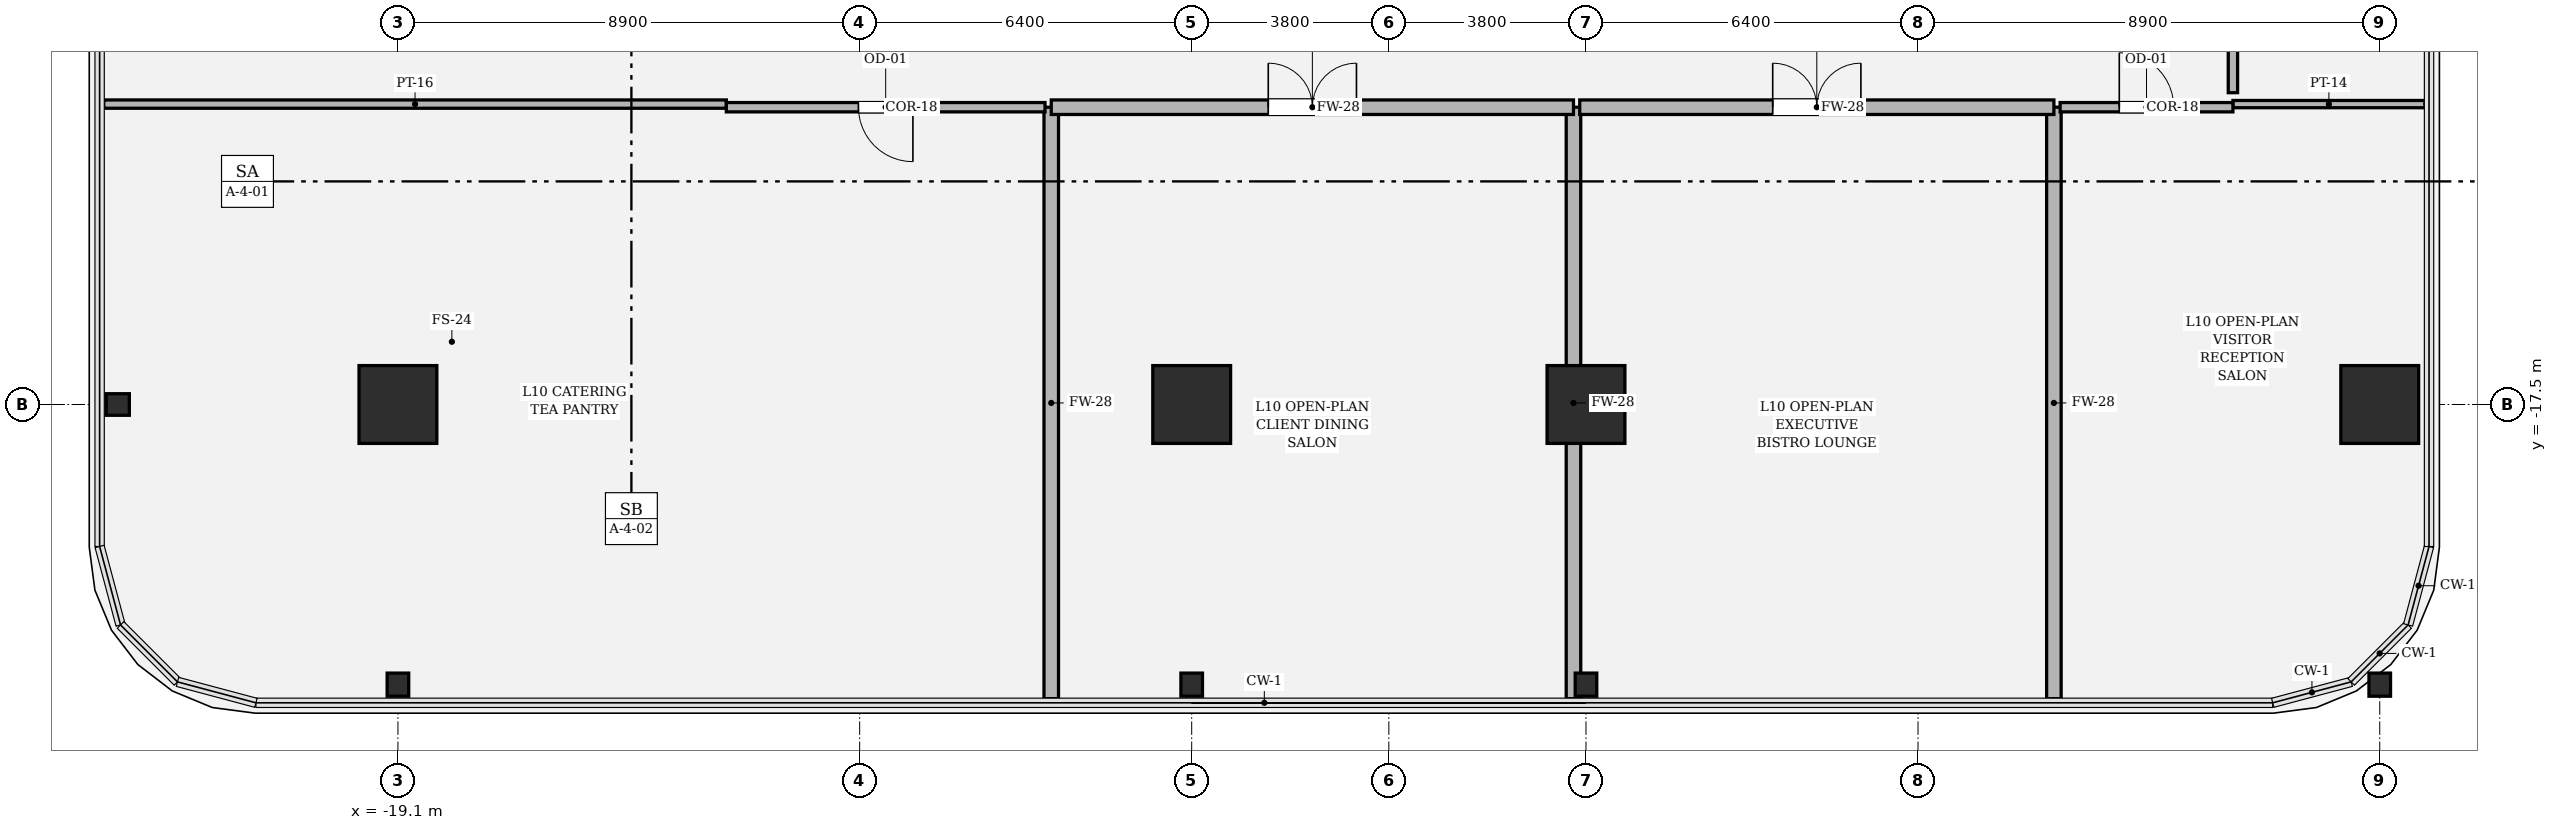
"""IFC4 building model, lengths in metres.
Left out: names, types, materials, properties, quantities, classifications, styles, units other than length and angle.
Written with IfcOpenShell. Run it as: python <this file> out.ifc"""

import sys

from ifc_helpers import new_model, si_unit, direction, frame, frame_2d, origin, origin_2d, place, context, subcontext, project, spatial, rectangle, hollow_rectangle, i_section, extrude, element, fill, save


model = new_model("IFC4")
c1 = context("Model", 3, precision=1e-05, world=origin(), true_north=direction((0.0, 1.0)))
c2 = subcontext(c1, "Body", "Model", "MODEL_VIEW")
j1 = project(units=[si_unit("LENGTHUNIT", "METRE"), si_unit("PLANEANGLEUNIT", "RADIAN")], contexts=[c1])
p1 = place(None, origin())
s1 = spatial("IfcSite", under=j1, at=p1, CompositionType="ELEMENT")
p2 = place(p1, origin())
s2 = spatial("IfcBuilding", under=s1, at=p2, CompositionType="ELEMENT")
p3 = place(p2, frame((0.0, 0.0, 48.45)))
s3 = spatial("IfcBuildingStorey", under=s2, at=p3, CompositionType="ELEMENT", Elevation=48.45)
for number, where, z_axis, x_axis in (
    (1, (-19.1, -17.5, 0.0), (0.0, 0.0, 1.0), (1.0, 0.0, 0.0)),
    (2, (-3.8, -17.5, 0.0), (0.0, 0.0, 1.0), (1.0, 0.0, 0.0)),
    (3, (3.8, -17.5, 0.0), (0.0, 0.0, 1.0), (1.0, 0.0, 0.0)),
    (4, (19.1, -17.5, 0.0), (0.0, 0.0, 1.0), (1.0, 0.0, 0.0)),
):
    element("IfcColumn", number, at=place(p3, frame(where, z_axis=z_axis, x_axis=x_axis)), inside=s3, PredefinedType="COLUMN", context=c2, shape_type="SweptSolid", body=[
        extrude(hollow_rectangle(XDim=1.5, YDim=1.5, WallThickness=0.045, at=origin_2d()), origin(), (0.0, 0.0, 1.0), 4.05),
    ])
for number, where, z_axis, x_axis in (
    (5, (-19.1, -22.9, 0.0), (0.0, 0.0, 1.0), (1.0, 0.0, 0.0)),
    (6, (-3.8, -22.9, 0.0), (0.0, 0.0, 1.0), (1.0, 0.0, 0.0)),
    (7, (3.8, -22.9, 0.0), (0.0, 0.0, 1.0), (1.0, 0.0, 0.0)),
    (8, (19.1, -22.9, 0.0), (0.0, 0.0, 1.0), (1.0, 0.0, 0.0)),
    (9, (-24.5, -17.5, 0.0), (0.0, 0.0, 1.0), (0.0, 1.0, 0.0)),
):
    element("IfcColumn", number, at=place(p3, frame(where, z_axis=z_axis, x_axis=x_axis)), inside=s3, PredefinedType="COLUMN", context=c2, shape_type="SweptSolid", body=[
        extrude(i_section(OverallWidth=0.416, OverallDepth=0.446, WebThickness=0.039, FlangeThickness=0.062, FilletRadius=0.018, at=origin_2d()), origin(), (0.0, 0.0, 1.0), 4.048),
    ])
p4 = place(p3, frame((3.559, -11.77, 0.0), z_axis=(0.0, 0.0, 1.0), x_axis=(0.0, -1.0, 0.0)))
e10 = element("IfcWall", 10, at=p4, inside=s3, PredefinedType="SOLIDWALL", context=c2, shape_type="SweptSolid", body=[
    extrude(rectangle(XDim=11.4, YDim=0.28, at=frame_2d((5.7, 0.0))), origin(), (0.0, 0.0, 1.0), 2.484),
])
p5 = place(p3, frame((-6.507, -23.17, 0.0), z_axis=(0.0, 0.0, 1.0), x_axis=(0.0, 1.0, 0.0)))
e11 = element("IfcWall", 11, at=p5, inside=s3, PredefinedType="SOLIDWALL", context=c2, shape_type="SweptSolid", body=[
    extrude(rectangle(XDim=11.4, YDim=0.28, at=frame_2d((5.7, 0.0))), origin(), (0.0, 0.0, 1.0), 2.524),
])
p6 = place(p3, frame((-6.507, -11.77, 0.0), z_axis=(0.0, 0.0, 1.0), x_axis=(1.0, 0.0, 0.0)))
e12 = element("IfcWall", 12, at=p6, inside=s3, PredefinedType="SOLIDWALL", context=c2, shape_type="SweptSolid", body=[
    extrude(rectangle(XDim=10.066, YDim=0.28, at=frame_2d((5.033, 0.0))), origin(), (0.0, 0.0, 1.0), 3.104),
])
p7 = place(p6, frame((4.183, 0.0, 0.0)))
e13 = element("IfcOpeningElement", 13, at=p7, cuts=e12, PredefinedType="OPENING", context=c2, shape_type="SweptSolid", body=[
    extrude(rectangle(XDim=1.7, YDim=2.3, at=frame_2d((0.85, 1.15))), frame((0.0, 0.15, 0.0), z_axis=(0.0, -1.0, 0.0), x_axis=(1.0, 0.0, 0.0)), (0.0, 0.0, 1.0), 0.3),
])
p8 = place(p3, frame((12.819, -11.77, 0.0), z_axis=(0.0, 0.0, 1.0), x_axis=(0.0, -1.0, 0.0)))
e14 = element("IfcWall", 14, at=p8, inside=s3, PredefinedType="SOLIDWALL", context=c2, shape_type="SweptSolid", body=[
    extrude(rectangle(XDim=11.4, YDim=0.28, at=frame_2d((5.7, 0.0))), origin(), (0.0, 0.0, 1.0), 2.524),
])
p9 = place(p3, frame((3.679, -11.77, 0.0), z_axis=(0.0, 0.0, 1.0), x_axis=(1.0, 0.0, 0.0)))
e15 = element("IfcWall", 15, at=p9, inside=s3, PredefinedType="SOLIDWALL", context=c2, shape_type="SweptSolid", body=[
    extrude(rectangle(XDim=9.14, YDim=0.28, at=frame_2d((4.57, 0.0))), origin(), (0.0, 0.0, 1.0), 3.104),
])
p10 = place(p9, frame((3.72, 0.0, 0.0)))
e16 = element("IfcOpeningElement", 16, at=p10, cuts=e15, PredefinedType="OPENING", context=c2, shape_type="SweptSolid", body=[
    extrude(rectangle(XDim=1.7, YDim=2.3, at=frame_2d((0.85, 1.15))), frame((0.0, 0.15, 0.0), z_axis=(0.0, -1.0, 0.0), x_axis=(1.0, 0.0, 0.0)), (0.0, 0.0, 1.0), 0.3),
])
p11 = place(p3, frame((-24.77, -11.71, 0.0), z_axis=(0.0, 0.0, 1.0), x_axis=(1.0, 0.0, 0.0)))
e17 = element("IfcWall", 17, at=p11, inside=s3, PredefinedType="PARTITIONING", context=c2, shape_type="SweptSolid", body=[
    extrude(rectangle(XDim=12.0, YDim=0.16, at=frame_2d((6.0, 0.0))), origin(), (0.0, 0.0, 1.0), 2.524),
])
p12 = place(p3, frame((-12.77, -11.77, 0.0), z_axis=(0.0, 0.0, 1.0), x_axis=(1.0, 0.0, 0.0)))
e18 = element("IfcWall", 18, at=p12, inside=s3, PredefinedType="PARTITIONING", context=c2, shape_type="SweptSolid", body=[
    extrude(rectangle(XDim=6.143, YDim=0.18, at=frame_2d((3.072, 0.0))), origin(), (0.0, 0.0, 1.0), 3.104),
])
p13 = place(p12, frame((2.546, 0.0, 0.0)))
e19 = element("IfcOpeningElement", 19, at=p13, cuts=e18, PredefinedType="OPENING", context=c2, shape_type="SweptSolid", body=[
    extrude(rectangle(XDim=1.05, YDim=2.2, at=frame_2d((0.525, 1.1))), frame((0.0, 0.1, 0.0), z_axis=(0.0, -1.0, 0.0), x_axis=(1.0, 0.0, 0.0)), (0.0, 0.0, 1.0), 0.2),
])
p14 = place(p3, frame((16.27, -11.71, 0.0), z_axis=(0.0, 0.0, 1.0), x_axis=(1.0, 0.0, 0.0)))
e20 = element("IfcWall", 20, at=p14, inside=s3, PredefinedType="PARTITIONING", context=c2, shape_type="SweptSolid", body=[
    extrude(rectangle(XDim=3.7, YDim=0.14, at=frame_2d((1.85, 0.0))), origin(), (0.0, 0.0, 1.0), 3.104),
])
p15 = place(p3, frame((12.939, -11.77, 0.0), z_axis=(0.0, 0.0, 1.0), x_axis=(1.0, 0.0, 0.0)))
e21 = element("IfcWall", 21, at=p15, inside=s3, PredefinedType="PARTITIONING", context=c2, shape_type="SweptSolid", body=[
    extrude(rectangle(XDim=3.331, YDim=0.18, at=frame_2d((1.666, 0.0))), origin(), (0.0, 0.0, 1.0), 3.354),
])
p16 = place(p15, frame((1.14, 0.0, 0.0)))
e22 = element("IfcOpeningElement", 22, at=p16, cuts=e21, PredefinedType="OPENING", context=c2, shape_type="SweptSolid", body=[
    extrude(rectangle(XDim=1.05, YDim=2.2, at=frame_2d((0.525, 1.1))), frame((0.0, 0.1, 0.0), z_axis=(0.0, -1.0, 0.0), x_axis=(1.0, 0.0, 0.0)), (0.0, 0.0, 1.0), 0.2),
])
p17 = place(p3, frame((16.27, -11.49, 0.0), z_axis=(0.0, 0.0, 1.0), x_axis=(0.0, 1.0, 0.0)))
e23 = element("IfcWall", 23, at=p17, inside=s3, PredefinedType="PARTITIONING", context=c2, shape_type="SweptSolid", body=[
    extrude(rectangle(XDim=8.196, YDim=0.18, at=frame_2d((4.098, 0.0))), origin(), (0.0, 0.0, 1.0), 3.104),
])
p18 = place(p17, frame((3.588, 0.0, 0.0)))
e24 = element("IfcOpeningElement", 24, at=p18, cuts=e23, PredefinedType="OPENING", context=c2, shape_type="SweptSolid", body=[
    extrude(rectangle(XDim=1.02, YDim=2.2, at=frame_2d((0.51, 1.1))), frame((0.0, 0.1, 0.0), z_axis=(0.0, -1.0, 0.0), x_axis=(1.0, 0.0, 0.0)), (0.0, 0.0, 1.0), 0.2),
])
p19 = place(p7, origin())
e25 = element("IfcDoor", 25, at=p19, inside=s3, OperationType="DOUBLE_DOOR_SINGLE_SWING", PredefinedType="DOOR", context=c2, shape_type="SweptSolid", body=[
    extrude(rectangle(XDim=1.7, YDim=2.3, at=frame_2d((0.85, 1.15))), frame((0.0, 0.025, 0.0), z_axis=(0.0, -1.0, 0.0), x_axis=(1.0, 0.0, 0.0)), (0.0, 0.0, 1.0), 0.05),
])
fill(e13, e25)
p20 = place(p10, origin())
e26 = element("IfcDoor", 26, at=p20, inside=s3, OperationType="DOUBLE_DOOR_SINGLE_SWING", PredefinedType="DOOR", context=c2, shape_type="SweptSolid", body=[
    extrude(rectangle(XDim=1.7, YDim=2.3, at=frame_2d((0.85, 1.15))), frame((0.0, 0.025, 0.0), z_axis=(0.0, -1.0, 0.0), x_axis=(1.0, 0.0, 0.0)), (0.0, 0.0, 1.0), 0.05),
])
fill(e16, e26)
p21 = place(p13, origin())
e27 = element("IfcDoor", 27, at=p21, inside=s3, OperationType="SINGLE_SWING_RIGHT", PredefinedType="DOOR", context=c2, shape_type="SweptSolid", body=[
    extrude(rectangle(XDim=1.05, YDim=2.2, at=frame_2d((0.525, 1.1))), frame((0.0, 0.025, 0.0), z_axis=(0.0, -1.0, 0.0), x_axis=(1.0, 0.0, 0.0)), (0.0, 0.0, 1.0), 0.05),
])
fill(e19, e27)
p22 = place(p16, origin())
e28 = element("IfcDoor", 28, at=p22, inside=s3, OperationType="SINGLE_SWING_LEFT", PredefinedType="DOOR", context=c2, shape_type="SweptSolid", body=[
    extrude(rectangle(XDim=1.05, YDim=2.2, at=frame_2d((0.525, 1.1))), frame((0.0, 0.025, 0.0), z_axis=(0.0, -1.0, 0.0), x_axis=(1.0, 0.0, 0.0)), (0.0, 0.0, 1.0), 0.05),
])
fill(e22, e28)
save(model, sys.argv[1])
